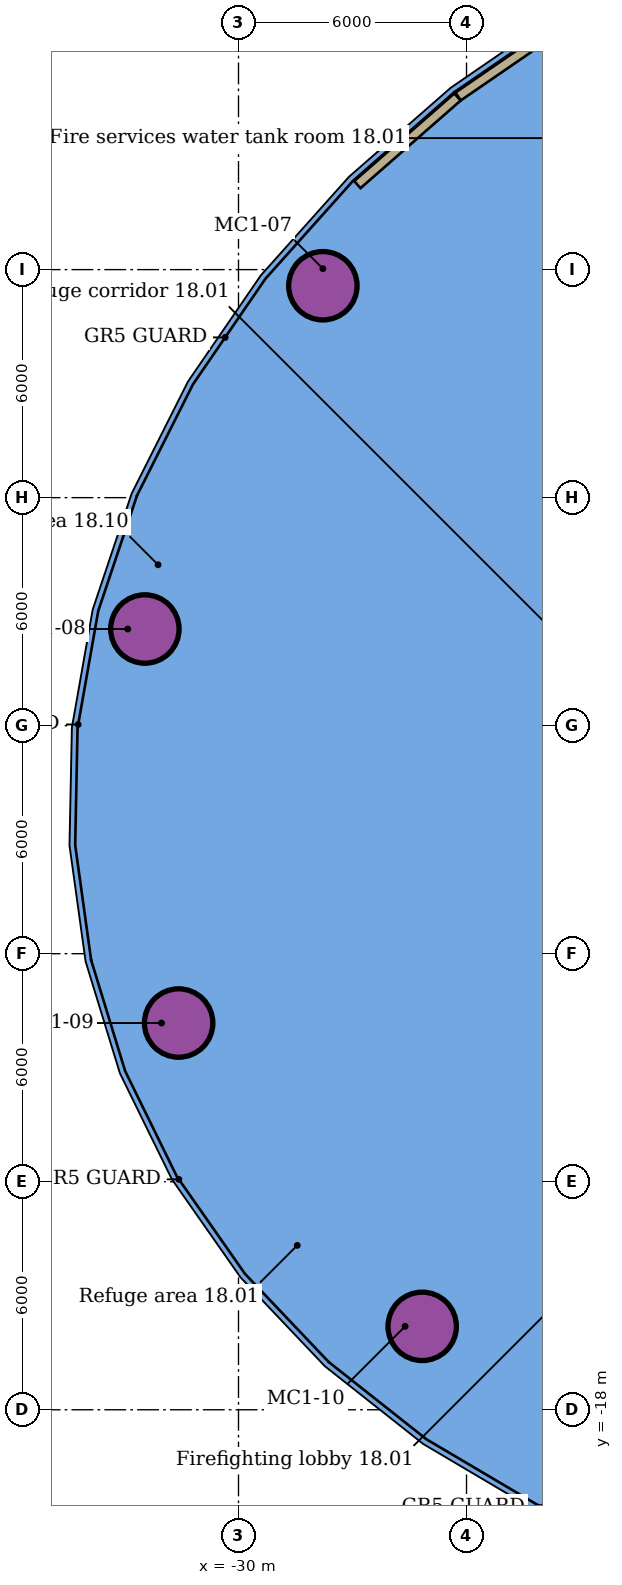
"""IFC4 building model, lengths in metres.
Left out: names, types, materials, properties, quantities, classifications, styles, units other than length and angle.
Written with IfcOpenShell. Run it as: python <this file> out.ifc"""

import sys

from ifc_helpers import new_model, si_unit, direction, frame, frame_2d, origin, origin_2d, place, context, subcontext, project, spatial, rectangle, hollow_circle, extrude, element, save


model = new_model("IFC4")
c1 = context("Model", 3, precision=1e-05, world=origin(), true_north=direction((0.0, 1.0)))
c2 = subcontext(c1, "Body", "Model", "MODEL_VIEW")
j1 = project(units=[si_unit("LENGTHUNIT", "METRE"), si_unit("PLANEANGLEUNIT", "RADIAN")], contexts=[c1])
p1 = place(None, origin())
s1 = spatial("IfcSite", under=j1, at=p1, CompositionType="ELEMENT")
p2 = place(p1, origin())
s2 = spatial("IfcBuilding", under=s1, at=p2, CompositionType="ELEMENT")
p3 = place(p2, frame((0.0, 0.0, 84.1)))
s3 = spatial("IfcBuildingStorey", under=s2, at=p3, CompositionType="ELEMENT", Elevation=84.1)
for number, where, z_axis, x_axis in (
    (1, (-27.78, 11.576, 0.0), (0.0, 0.0, 1.0), (1.0, 0.0, 0.0)),
    (2, (-32.464, 2.543, 0.0), (0.0, 0.0, 1.0), (1.0, 0.0, 0.0)),
    (3, (-31.575, -7.824, 0.0), (0.0, 0.0, 1.0), (1.0, 0.0, 0.0)),
    (4, (-25.166, -15.805, 0.0), (0.0, 0.0, 1.0), (1.0, 0.0, 0.0)),
):
    element("IfcColumn", number, at=place(p3, frame(where, z_axis=z_axis, x_axis=x_axis)), inside=s3, PredefinedType="COLUMN", context=c2, shape_type="SweptSolid", body=[
        extrude(hollow_circle(Radius=0.9, WallThickness=0.06, at=origin_2d()), origin(), (0.0, 0.0, 1.0), 4.35),
    ])
p4 = place(p3, frame((-21.273, 18.58, 0.0), z_axis=(0.0, 0.0, 1.0), x_axis=(-0.824269010653, -0.566198373432, 0.0)))
e5 = element("IfcWall", 5, at=p4, inside=s3, PredefinedType="SOLIDWALL", context=c2, shape_type="SweptSolid", body=[
    extrude(rectangle(XDim=3.575, YDim=0.25, at=frame_2d((1.788, 0.0))), origin(), (0.0, 0.0, 1.0), 3.95),
])
p5 = place(p3, frame((-24.238, 16.542, 0.0), z_axis=(0.0, 0.0, 1.0), x_axis=(-0.752650141407, -0.658420659335, 0.0)))
e6 = element("IfcWall", 6, at=p5, inside=s3, PredefinedType="SOLIDWALL", context=c2, shape_type="SweptSolid", body=[
    extrude(rectangle(XDim=3.5, YDim=0.25, at=frame_2d((1.75, 0.0))), origin(), (0.0, 0.0, 1.0), 3.95),
])
save(model, sys.argv[1])
